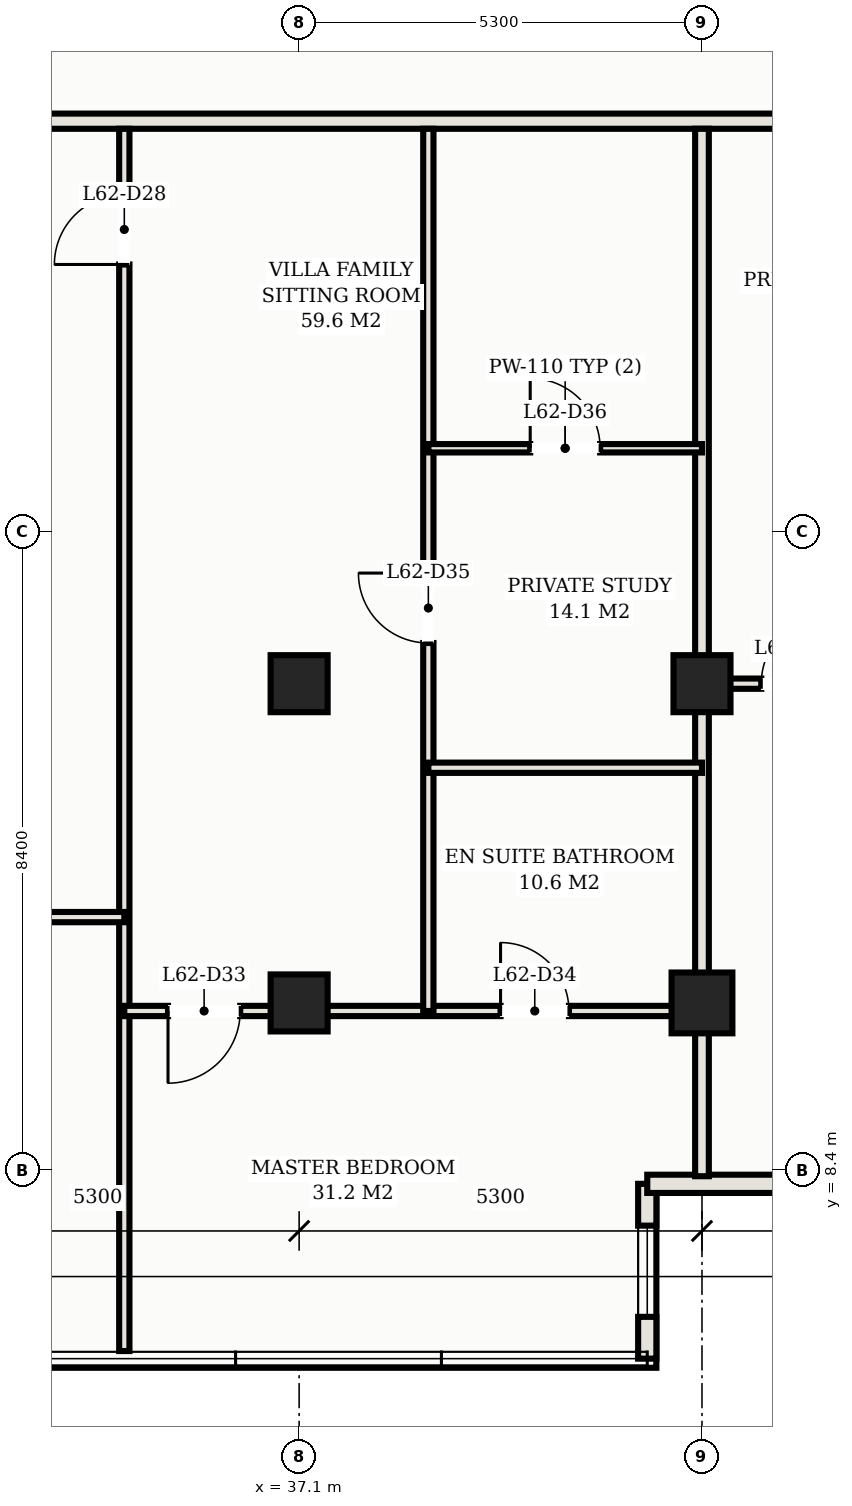
"""IFC4 building model, lengths in metres.
Left out: names, types, materials, properties, quantities, classifications, styles, units other than length and angle.
Written with IfcOpenShell. Run it as: python <this file> out.ifc"""

import sys

from ifc_helpers import new_model, si_unit, direction, frame, frame_2d, origin, origin_2d, place, context, subcontext, project, spatial, rectangle, hollow_rectangle, extrude, element, fill, save


model = new_model("IFC4")
c1 = context("Model", 3, precision=1e-05, world=origin(), true_north=direction((0.0, 1.0)))
c2 = subcontext(c1, "Body", "Model", "MODEL_VIEW")
j1 = project(units=[si_unit("LENGTHUNIT", "METRE"), si_unit("PLANEANGLEUNIT", "RADIAN")], contexts=[c1])
p1 = place(None, origin())
s1 = spatial("IfcSite", under=j1, at=p1, CompositionType="ELEMENT")
p2 = place(p1, origin())
s2 = spatial("IfcBuilding", under=s1, at=p2, CompositionType="ELEMENT")
p3 = place(p2, frame((0.0, 0.0, 226.4)))
s3 = spatial("IfcBuildingStorey", under=s2, at=p3, CompositionType="ELEMENT", Elevation=226.4)
for number, where, z_axis, x_axis in (
    (1, (37.1, 14.8, 0.0), (0.0, 0.0, 1.0), (1.0, 0.0, 0.0)),
    (2, (37.1, 10.6, 0.0), (0.0, 0.0, 1.0), (1.0, 0.0, 0.0)),
    (3, (42.4, 14.8, 0.0), (0.0, 0.0, 1.0), (1.0, 0.0, 0.0)),
):
    element("IfcColumn", number, at=place(p3, frame(where, z_axis=z_axis, x_axis=x_axis)), inside=s3, PredefinedType="COLUMN", context=c2, shape_type="SweptSolid", body=[
        extrude(hollow_rectangle(XDim=0.75, YDim=0.75, WallThickness=0.025, at=origin_2d()), origin(), (0.0, 0.0, 1.0), 3.3),
    ])
p4 = place(p3, frame((42.4, 10.6, 0.0), z_axis=(0.0, 0.0, 1.0), x_axis=(1.0, 0.0, 0.0)))
e4 = element("IfcColumn", 4, at=p4, inside=s3, PredefinedType="COLUMN", context=c2, shape_type="SweptSolid", body=[
    extrude(hollow_rectangle(XDim=0.8, YDim=0.8, WallThickness=0.028, at=origin_2d()), origin(), (0.0, 0.0, 1.0), 3.3),
])
p5 = place(p3, frame((41.68, 5.92, 0.0), z_axis=(0.0, 0.0, 1.0), x_axis=(0.0, 1.0, 0.0)))
e5 = element("IfcWall", 5, at=p5, inside=s3, PredefinedType="SOLIDWALL", context=c2, shape_type="SweptSolid", body=[
    extrude(rectangle(XDim=2.3, YDim=0.24, at=frame_2d((1.15, 0.0))), origin(), (0.0, 0.0, 1.0), 3.11),
])
p6 = place(p5, frame((0.55, 0.0, 0.75)))
e6 = element("IfcOpeningElement", 6, at=p6, cuts=e5, PredefinedType="OPENING", context=c2, shape_type="SweptSolid", body=[
    extrude(rectangle(XDim=1.2, YDim=1.5, at=frame_2d((0.6, 0.75))), frame((0.0, 0.13, 0.0), z_axis=(0.0, -1.0, 0.0), x_axis=(1.0, 0.0, 0.0)), (0.0, 0.0, 1.0), 0.26),
])
p7 = place(p3, frame((41.68, 8.22, 0.0), z_axis=(0.0, 0.0, 1.0), x_axis=(1.0, 0.0, 0.0)))
e7 = element("IfcWall", 7, at=p7, inside=s3, PredefinedType="SOLIDWALL", context=c2, shape_type="SweptSolid", body=[
    extrude(rectangle(XDim=2.3, YDim=0.24, at=frame_2d((1.15, 0.0))), origin(), (0.0, 0.0, 1.0), 3.11),
])
p8 = place(p3, frame((6.72, 22.2, 0.0), z_axis=(0.0, 0.0, 1.0), x_axis=(1.0, 0.0, 0.0)))
e8 = element("IfcWall", 8, at=p8, inside=s3, PredefinedType="PARTITIONING", context=c2, shape_type="SweptSolid", body=[
    extrude(rectangle(XDim=39.56, YDim=0.2, at=frame_2d((19.78, 0.0))), origin(), (0.0, 0.0, 1.0), 2.43),
])
p9 = place(p8, frame((4.63, 0.0, 0.0)))
e9 = element("IfcOpeningElement", 9, at=p9, cuts=e8, PredefinedType="OPENING", context=c2, shape_type="SweptSolid", body=[
    extrude(rectangle(XDim=1.1, YDim=2.25, at=frame_2d((0.55, 1.125))), frame((0.0, 0.11, 0.0), z_axis=(0.0, -1.0, 0.0), x_axis=(1.0, 0.0, 0.0)), (0.0, 0.0, 1.0), 0.22),
])
p10 = place(p8, frame((20.53, 0.0, 0.0)))
e10 = element("IfcOpeningElement", 10, at=p10, cuts=e8, PredefinedType="OPENING", context=c2, shape_type="SweptSolid", body=[
    extrude(rectangle(XDim=1.1, YDim=2.25, at=frame_2d((0.55, 1.125))), frame((0.0, 0.11, 0.0), z_axis=(0.0, -1.0, 0.0), x_axis=(1.0, 0.0, 0.0)), (0.0, 0.0, 1.0), 0.22),
])
p11 = place(p8, frame((1.435, 0.0, 0.0)))
e11 = element("IfcOpeningElement", 11, at=p11, cuts=e8, PredefinedType="OPENING", context=c2, shape_type="SweptSolid", body=[
    extrude(rectangle(XDim=0.92, YDim=2.15, at=frame_2d((0.46, 1.075))), frame((0.0, 0.11, 0.0), z_axis=(0.0, -1.0, 0.0), x_axis=(1.0, 0.0, 0.0)), (0.0, 0.0, 1.0), 0.22),
])
p12 = place(p8, frame((37.205, 0.0, 0.0)))
e12 = element("IfcOpeningElement", 12, at=p12, cuts=e8, PredefinedType="OPENING", context=c2, shape_type="SweptSolid", body=[
    extrude(rectangle(XDim=0.92, YDim=2.15, at=frame_2d((0.46, 1.075))), frame((0.0, 0.11, 0.0), z_axis=(0.0, -1.0, 0.0), x_axis=(1.0, 0.0, 0.0)), (0.0, 0.0, 1.0), 0.22),
])
p13 = place(p3, frame((42.4, 8.32, 0.0), z_axis=(0.0, 0.0, 1.0), x_axis=(0.0, 1.0, 0.0)))
e13 = element("IfcWall", 13, at=p13, inside=s3, PredefinedType="PARTITIONING", context=c2, shape_type="SweptSolid", body=[
    extrude(rectangle(XDim=13.78, YDim=0.18, at=frame_2d((6.89, 0.0))), origin(), (0.0, 0.0, 1.0), 2.43),
])
p14 = place(p3, frame((34.8, 6.02, 0.0), z_axis=(0.0, 0.0, 1.0), x_axis=(0.0, 1.0, 0.0)))
e14 = element("IfcWall", 14, at=p14, inside=s3, PredefinedType="PARTITIONING", context=c2, shape_type="SweptSolid", body=[
    extrude(rectangle(XDim=16.08, YDim=0.135, at=frame_2d((8.04, 0.0))), origin(), (0.0, 0.0, 1.0), 2.43),
])
p15 = place(p14, frame((14.295, 0.0, 0.0)))
e15 = element("IfcOpeningElement", 15, at=p15, cuts=e14, PredefinedType="OPENING", context=c2, shape_type="SweptSolid", body=[
    extrude(rectangle(XDim=0.92, YDim=2.15, at=frame_2d((0.46, 1.075))), frame((0.0, 0.078, 0.0), z_axis=(0.0, -1.0, 0.0), x_axis=(1.0, 0.0, 0.0)), (0.0, 0.0, 1.0), 0.155),
])
p16 = place(p3, frame((26.5, 11.729, 0.0), z_axis=(0.0, 0.0, 1.0), x_axis=(1.0, 0.0, 0.0)))
e16 = element("IfcWall", 16, at=p16, inside=s3, PredefinedType="PARTITIONING", context=c2, shape_type="SweptSolid", body=[
    extrude(rectangle(XDim=8.3, YDim=0.135, at=frame_2d((4.15, 0.0))), origin(), (0.0, 0.0, 1.0), 2.43),
])
p17 = place(p16, frame((0.815, 0.0, 0.0)))
e17 = element("IfcOpeningElement", 17, at=p17, cuts=e16, PredefinedType="OPENING", context=c2, shape_type="SweptSolid", body=[
    extrude(rectangle(XDim=0.92, YDim=2.15, at=frame_2d((0.46, 1.075))), frame((0.0, 0.078, 0.0), z_axis=(0.0, -1.0, 0.0), x_axis=(1.0, 0.0, 0.0)), (0.0, 0.0, 1.0), 0.155),
])
p18 = place(p3, frame((34.8, 10.494, 0.0), z_axis=(0.0, 0.0, 1.0), x_axis=(1.0, 0.0, 0.0)))
e18 = element("IfcWall", 18, at=p18, inside=s3, PredefinedType="PARTITIONING", context=c2, shape_type="SweptSolid", body=[
    extrude(rectangle(XDim=7.6, YDim=0.135, at=frame_2d((3.8, 0.0))), origin(), (0.0, 0.0, 1.0), 2.43),
])
p19 = place(p18, frame((0.575, 0.0, 0.0)))
e19 = element("IfcOpeningElement", 19, at=p19, cuts=e18, PredefinedType="OPENING", context=c2, shape_type="SweptSolid", body=[
    extrude(rectangle(XDim=0.95, YDim=2.15, at=frame_2d((0.475, 1.075))), frame((0.0, 0.078, 0.0), z_axis=(0.0, -1.0, 0.0), x_axis=(1.0, 0.0, 0.0)), (0.0, 0.0, 1.0), 0.155),
])
p20 = place(p18, frame((4.95, 0.0, 0.0)))
e20 = element("IfcOpeningElement", 20, at=p20, cuts=e18, PredefinedType="OPENING", context=c2, shape_type="SweptSolid", body=[
    extrude(rectangle(XDim=0.9, YDim=2.15, at=frame_2d((0.45, 1.075))), frame((0.0, 0.078, 0.0), z_axis=(0.0, -1.0, 0.0), x_axis=(1.0, 0.0, 0.0)), (0.0, 0.0, 1.0), 0.155),
])
p21 = place(p3, frame((38.8, 10.494, 0.0), z_axis=(0.0, 0.0, 1.0), x_axis=(0.0, 1.0, 0.0)))
e21 = element("IfcWall", 21, at=p21, inside=s3, PredefinedType="PARTITIONING", context=c2, shape_type="SweptSolid", body=[
    extrude(rectangle(XDim=11.606, YDim=0.135, at=frame_2d((5.803, 0.0))), origin(), (0.0, 0.0, 1.0), 2.43),
])
p22 = place(p21, frame((4.841, 0.0, 0.0)))
e22 = element("IfcOpeningElement", 22, at=p22, cuts=e21, PredefinedType="OPENING", context=c2, shape_type="SweptSolid", body=[
    extrude(rectangle(XDim=0.92, YDim=2.15, at=frame_2d((0.46, 1.075))), frame((0.0, 0.078, 0.0), z_axis=(0.0, -1.0, 0.0), x_axis=(1.0, 0.0, 0.0)), (0.0, 0.0, 1.0), 0.155),
])
p23 = place(p3, frame((38.8, 13.694, 0.0), z_axis=(0.0, 0.0, 1.0), x_axis=(1.0, 0.0, 0.0)))
e23 = element("IfcWall", 23, at=p23, inside=s3, PredefinedType="PARTITIONING", context=c2, shape_type="SweptSolid", body=[
    extrude(rectangle(XDim=3.6, YDim=0.135, at=frame_2d((1.8, 0.0))), origin(), (0.0, 0.0, 1.0), 2.43),
])
p24 = place(p3, frame((38.8, 17.897, 0.0), z_axis=(0.0, 0.0, 1.0), x_axis=(1.0, 0.0, 0.0)))
e24 = element("IfcWall", 24, at=p24, inside=s3, PredefinedType="MOVABLE", context=c2, shape_type="SweptSolid", body=[
    extrude(rectangle(XDim=3.6, YDim=0.11, at=frame_2d((1.8, 0.0))), origin(), (0.0, 0.0, 1.0), 2.43),
])
p25 = place(p24, frame((1.34, 0.0, 0.0)))
e25 = element("IfcOpeningElement", 25, at=p25, cuts=e24, PredefinedType="OPENING", context=c2, shape_type="SweptSolid", body=[
    extrude(rectangle(XDim=0.92, YDim=2.15, at=frame_2d((0.46, 1.075))), frame((0.0, 0.065, 0.0), z_axis=(0.0, -1.0, 0.0), x_axis=(1.0, 0.0, 0.0)), (0.0, 0.0, 1.0), 0.13),
])
p26 = place(p3, frame((42.4, 14.8, 0.0), z_axis=(0.0, 0.0, 1.0), x_axis=(1.0, 0.0, 0.0)))
e26 = element("IfcWall", 26, at=p26, inside=s3, PredefinedType="PARTITIONING", context=c2, shape_type="SweptSolid", body=[
    extrude(rectangle(XDim=3.78, YDim=0.135, at=frame_2d((1.89, 0.0))), origin(), (0.0, 0.0, 1.0), 2.43),
])
p27 = place(p26, frame((0.78, 0.0, 0.0)))
e27 = element("IfcOpeningElement", 27, at=p27, cuts=e26, PredefinedType="OPENING", context=c2, shape_type="SweptSolid", body=[
    extrude(rectangle(XDim=0.92, YDim=2.15, at=frame_2d((0.46, 1.075))), frame((0.0, 0.078, 0.0), z_axis=(0.0, -1.0, 0.0), x_axis=(1.0, 0.0, 0.0)), (0.0, 0.0, 1.0), 0.155),
])
p28 = place(p6, origin())
e28 = element("IfcWindow", 28, at=p28, inside=s3, PartitioningType="SINGLE_PANEL", PredefinedType="WINDOW", context=c2, shape_type="SweptSolid", body=[
    extrude(rectangle(XDim=1.2, YDim=1.5, at=frame_2d((0.6, 0.75))), frame((0.0, 0.03, 0.0), z_axis=(0.0, -1.0, 0.0), x_axis=(1.0, 0.0, 0.0)), (0.0, 0.0, 1.0), 0.06),
])
fill(e6, e28)
p29 = place(p15, origin())
e29 = element("IfcDoor", 29, at=p29, inside=s3, OperationType="SINGLE_SWING_LEFT", PredefinedType="DOOR", context=c2, shape_type="SweptSolid", body=[
    extrude(rectangle(XDim=0.92, YDim=2.15, at=frame_2d((0.46, 1.075))), frame((0.0, 0.025, 0.0), z_axis=(0.0, -1.0, 0.0), x_axis=(1.0, 0.0, 0.0)), (0.0, 0.0, 1.0), 0.05),
])
fill(e15, e29)
p30 = place(p19, frame((0.95, 0.0, 0.0), z_axis=(0.0, 0.0, 1.0), x_axis=(-1.0, 0.0, 0.0)))
e30 = element("IfcDoor", 30, at=p30, inside=s3, OperationType="SINGLE_SWING_RIGHT", PredefinedType="DOOR", context=c2, shape_type="SweptSolid", body=[
    extrude(rectangle(XDim=0.95, YDim=2.15, at=frame_2d((0.475, 1.075))), frame((0.0, 0.025, 0.0), z_axis=(0.0, -1.0, 0.0), x_axis=(1.0, 0.0, 0.0)), (0.0, 0.0, 1.0), 0.05),
])
fill(e19, e30)
p31 = place(p20, origin())
e31 = element("IfcDoor", 31, at=p31, inside=s3, OperationType="SINGLE_SWING_LEFT", PredefinedType="DOOR", context=c2, shape_type="SweptSolid", body=[
    extrude(rectangle(XDim=0.9, YDim=2.15, at=frame_2d((0.45, 1.075))), frame((0.0, 0.025, 0.0), z_axis=(0.0, -1.0, 0.0), x_axis=(1.0, 0.0, 0.0)), (0.0, 0.0, 1.0), 0.05),
])
fill(e20, e31)
p32 = place(p22, origin())
e32 = element("IfcDoor", 32, at=p32, inside=s3, OperationType="SINGLE_SWING_RIGHT", PredefinedType="DOOR", context=c2, shape_type="SweptSolid", body=[
    extrude(rectangle(XDim=0.92, YDim=2.15, at=frame_2d((0.46, 1.075))), frame((0.0, 0.025, 0.0), z_axis=(0.0, -1.0, 0.0), x_axis=(1.0, 0.0, 0.0)), (0.0, 0.0, 1.0), 0.05),
])
fill(e22, e32)
p33 = place(p25, origin())
e33 = element("IfcDoor", 33, at=p33, inside=s3, OperationType="SINGLE_SWING_LEFT", PredefinedType="DOOR", context=c2, shape_type="SweptSolid", body=[
    extrude(rectangle(XDim=0.92, YDim=2.15, at=frame_2d((0.46, 1.075))), frame((0.0, 0.025, 0.0), z_axis=(0.0, -1.0, 0.0), x_axis=(1.0, 0.0, 0.0)), (0.0, 0.0, 1.0), 0.05),
])
fill(e25, e33)
p34 = place(p27, origin())
e34 = element("IfcDoor", 34, at=p34, inside=s3, OperationType="SINGLE_SWING_RIGHT", PredefinedType="DOOR", context=c2, shape_type="SweptSolid", body=[
    extrude(rectangle(XDim=0.92, YDim=2.15, at=frame_2d((0.46, 1.075))), frame((0.0, 0.025, 0.0), z_axis=(0.0, -1.0, 0.0), x_axis=(1.0, 0.0, 0.0)), (0.0, 0.0, 1.0), 0.05),
])
fill(e27, e34)
save(model, sys.argv[1])
